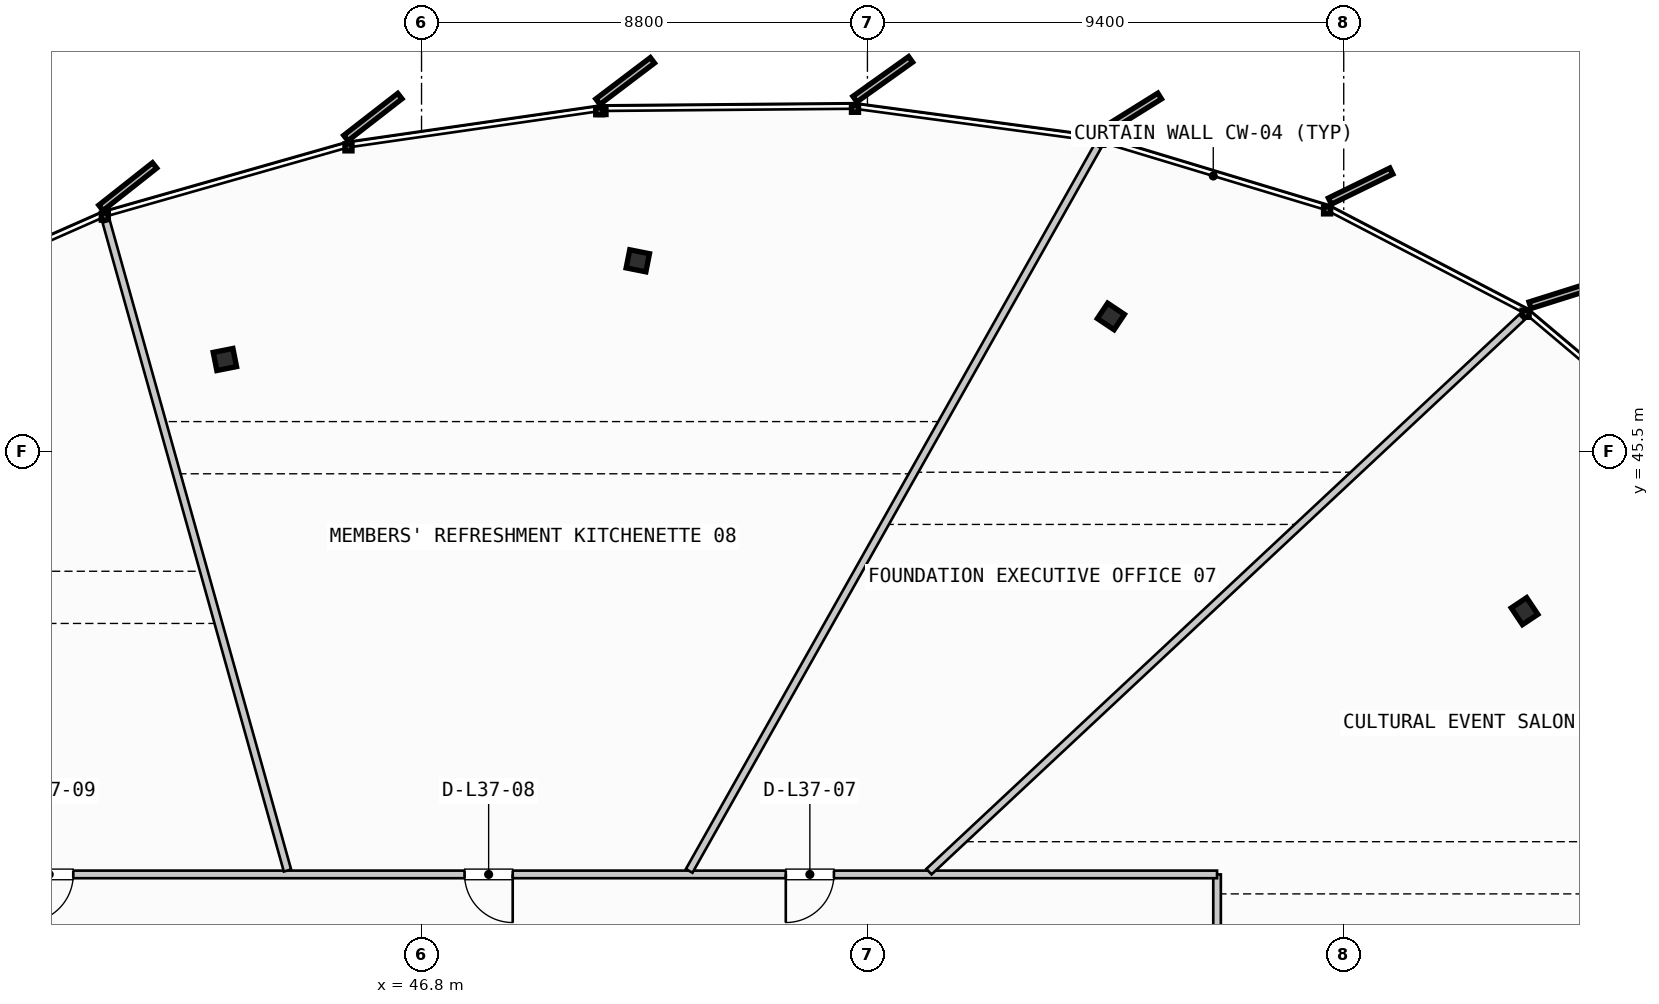
"""IFC4 building model, lengths in metres.
Left out: names, types, materials, properties, quantities, classifications, styles, units other than length and angle.
Written with IfcOpenShell. Run it as: python <this file> out.ifc"""

import sys

from ifc_helpers import new_model, si_unit, direction, frame, frame_2d, origin, origin_2d, place, context, subcontext, project, spatial, rectangle, i_section, extrude, source, transform, mapped, element, fill, save


model = new_model("IFC4")
c1 = context("Model", 3, precision=1e-05, world=origin(), true_north=direction((0.0, 1.0)))
c2 = subcontext(c1, "Body", "Model", "MODEL_VIEW")
j1 = project(units=[si_unit("LENGTHUNIT", "METRE"), si_unit("PLANEANGLEUNIT", "RADIAN")], contexts=[c1])
p1 = place(None, origin())
s1 = spatial("IfcSite", under=j1, at=p1, CompositionType="ELEMENT")
p2 = place(p1, origin())
s2 = spatial("IfcBuilding", under=s1, at=p2, CompositionType="ELEMENT")
p3 = place(p2, frame((0.0, 0.0, 146.55)))
s3 = spatial("IfcBuildingStorey", under=s2, at=p3, CompositionType="ELEMENT", Elevation=146.55)
m1 = source(origin(), c2, "Body", "SweptSolid", [
    extrude(i_section(OverallWidth=0.397, OverallDepth=0.365, WebThickness=0.028, FlangeThickness=0.044, FilletRadius=0.015, at=origin_2d()), origin(), (0.0, 0.0, 1.0), 3.3),
])
for number, where, z_axis, x_axis in (
    (1, (68.569, 42.345, 0.0), (0.0, 0.0, 1.0), (0.831, 0.556, 0.0)),
    (2, (60.405, 48.161, 0.0), (0.0, 0.0, 1.0), (0.556, 0.831, 0.0)),
    (3, (51.069, 49.259, 0.0), (0.0, 0.0, 1.0), (0.195, 0.981, 0.0)),
    (4, (42.919, 47.311, 0.0), (0.0, 0.0, 1.0), (-0.195, 0.981, 0.0)),
):
    element("IfcColumn", number, at=place(p3, frame(where, z_axis=z_axis, x_axis=x_axis)), inside=s3, PredefinedType="COLUMN", context=c2, shape_type="MappedRepresentation", body=[
        mapped(m1, transform((0.0, 0.0, 0.0), scale=1.0)),
    ])
p4 = place(p3, frame((62.5, 35.45, 0.0), z_axis=(0.0, 0.0, 1.0), x_axis=(0.0, 1.0, 0.0)))
e5 = element("IfcWall", 5, at=p4, inside=s3, PredefinedType="PARTITIONING", context=c2, shape_type="SweptSolid", body=[
    extrude(rectangle(XDim=1.7, YDim=0.15, at=frame_2d((0.85, 0.0))), origin(), (0.0, 0.0, 1.0), 2.305),
])
p5 = place(p3, frame((62.5, 37.15, 0.0), z_axis=(0.0, 0.0, 1.0), x_axis=(-1.0, 0.0, 0.0)))
e6 = element("IfcWall", 6, at=p5, inside=s3, PredefinedType="PARTITIONING", context=c2, shape_type="SweptSolid", body=[
    extrude(rectangle(XDim=31.4, YDim=0.15, at=frame_2d((15.7, 0.0))), origin(), (0.0, 0.0, 1.0), 2.305),
])
p6 = place(p5, frame((7.561, 0.0, 0.0)))
e7 = element("IfcOpeningElement", 7, at=p6, cuts=e6, PredefinedType="OPENING", context=c2, shape_type="SweptSolid", body=[
    extrude(rectangle(XDim=0.95, YDim=2.15, at=frame_2d((0.475, 1.075))), frame((0.0, 0.085, 0.0), z_axis=(0.0, -1.0, 0.0), x_axis=(1.0, 0.0, 0.0)), (0.0, 0.0, 1.0), 0.17),
])
p7 = place(p5, frame((13.901, 0.0, 0.0)))
e8 = element("IfcOpeningElement", 8, at=p7, cuts=e6, PredefinedType="OPENING", context=c2, shape_type="SweptSolid", body=[
    extrude(rectangle(XDim=0.95, YDim=2.15, at=frame_2d((0.475, 1.075))), frame((0.0, 0.085, 0.0), z_axis=(0.0, -1.0, 0.0), x_axis=(1.0, 0.0, 0.0)), (0.0, 0.0, 1.0), 0.17),
])
p8 = place(p5, frame((22.573, 0.0, 0.0)))
e9 = element("IfcOpeningElement", 9, at=p8, cuts=e6, PredefinedType="OPENING", context=c2, shape_type="SweptSolid", body=[
    extrude(rectangle(XDim=0.95, YDim=2.15, at=frame_2d((0.475, 1.075))), frame((0.0, 0.085, 0.0), z_axis=(0.0, -1.0, 0.0), x_axis=(1.0, 0.0, 0.0)), (0.0, 0.0, 1.0), 0.17),
])
p9 = place(p3, frame((56.814, 37.205, 0.0), z_axis=(0.0, 0.0, 1.0), x_axis=(0.730459008083, 0.68295654145, 0.0)))
e10 = element("IfcWall", 10, at=p9, inside=s3, PredefinedType="PARTITIONING", context=c2, shape_type="SweptSolid", body=[
    extrude(rectangle(XDim=16.02, YDim=0.15, at=frame_2d((8.01, 0.0))), origin(), (0.0, 0.0, 1.0), 2.305),
])
p10 = place(p3, frame((52.082, 37.22, 0.0), z_axis=(0.0, 0.0, 1.0), x_axis=(0.49120982272, 0.871041279196, 0.0)))
e11 = element("IfcWall", 11, at=p10, inside=s3, PredefinedType="PARTITIONING", context=c2, shape_type="SweptSolid", body=[
    extrude(rectangle(XDim=16.418, YDim=0.15, at=frame_2d((8.209, 0.0))), origin(), (0.0, 0.0, 1.0), 2.305),
])
p11 = place(p3, frame((44.154, 37.227, 0.0), z_axis=(0.0, 0.0, 1.0), x_axis=(-0.269090511443, 0.963114892758, 0.0)))
e12 = element("IfcWall", 12, at=p11, inside=s3, PredefinedType="PARTITIONING", context=c2, shape_type="SweptSolid", body=[
    extrude(rectangle(XDim=13.297, YDim=0.15, at=frame_2d((6.648, 0.0))), origin(), (0.0, 0.0, 1.0), 2.305),
])
m2 = source(origin(), c2, "Body", "SweptSolid", [
    extrude(rectangle(XDim=0.95, YDim=2.15, at=frame_2d((0.475, 1.075))), frame((0.0, 0.025, 0.0), z_axis=(0.0, -1.0, 0.0), x_axis=(1.0, 0.0, 0.0)), (0.0, 0.0, 1.0), 0.05),
])
p12 = place(p6, origin())
e13 = element("IfcDoor", 13, at=p12, inside=s3, OperationType="SINGLE_SWING_RIGHT", PredefinedType="DOOR", context=c2, shape_type="MappedRepresentation", body=[
    mapped(m2, transform((0.0, 0.0, 0.0), scale=1.0)),
])
fill(e7, e13)
p13 = place(p7, origin())
e14 = element("IfcDoor", 14, at=p13, inside=s3, OperationType="SINGLE_SWING_LEFT", PredefinedType="DOOR", context=c2, shape_type="MappedRepresentation", body=[
    mapped(m2, transform((0.0, 0.0, 0.0), scale=1.0)),
])
fill(e8, e14)
p14 = place(p8, origin())
e15 = element("IfcDoor", 15, at=p14, inside=s3, OperationType="SINGLE_SWING_RIGHT", PredefinedType="DOOR", context=c2, shape_type="MappedRepresentation", body=[
    mapped(m2, transform((0.0, 0.0, 0.0), scale=1.0)),
])
fill(e9, e15)
save(model, sys.argv[1])
